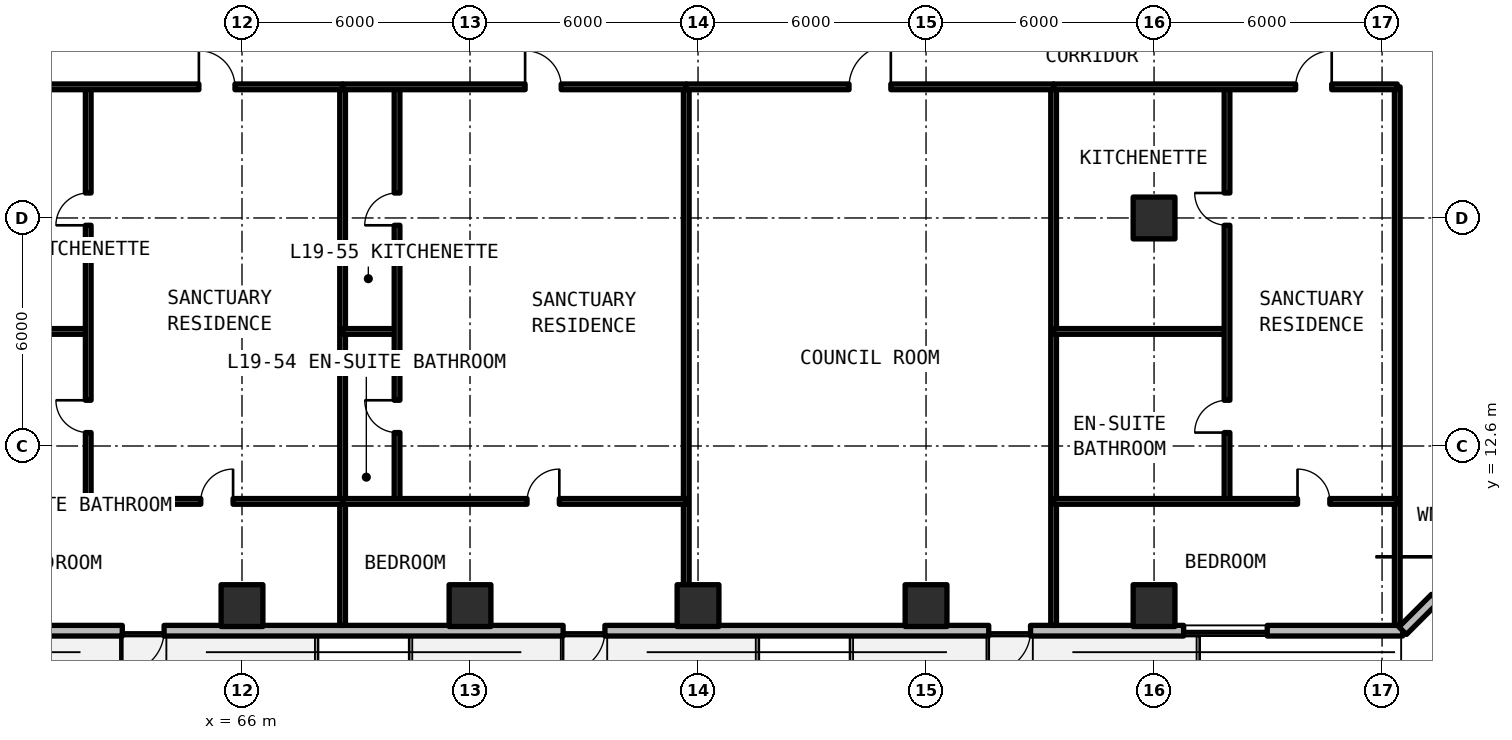
"""IFC4 building model, lengths in metres.
Left out: names, types, materials, properties, quantities, classifications, styles, units other than length and angle.
Written with IfcOpenShell. Run it as: python <this file> out.ifc"""

import sys

from ifc_helpers import new_model, si_unit, direction, frame, frame_2d, origin, origin_2d, place, context, subcontext, project, spatial, rectangle, extrude, element, fill, save


model = new_model("IFC4")
c1 = context("Model", 3, precision=1e-05, world=origin(), true_north=direction((0.0, 1.0)))
c2 = subcontext(c1, "Body", "Model", "MODEL_VIEW")
j1 = project(units=[si_unit("LENGTHUNIT", "METRE"), si_unit("PLANEANGLEUNIT", "RADIAN")], contexts=[c1])
p1 = place(None, origin())
s1 = spatial("IfcSite", under=j1, at=p1, CompositionType="ELEMENT")
p2 = place(p1, origin())
s2 = spatial("IfcBuilding", under=s1, at=p2, CompositionType="ELEMENT")
p3 = place(p2, frame((0.0, 0.0, 69.63)))
s3 = spatial("IfcBuildingStorey", under=s2, at=p3, CompositionType="ELEMENT", Elevation=69.63)
for number, where, z_axis, x_axis in (
    (1, (90.0, 18.6, 0.0), (0.0, 0.0, 1.0), (1.0, 0.0, 0.0)),
    (2, (66.0, 8.4, 0.0), (0.0, 0.0, 1.0), (1.0, 0.0, 0.0)),
    (3, (72.0, 8.4, 0.0), (0.0, 0.0, 1.0), (1.0, 0.0, 0.0)),
    (4, (78.0, 8.4, 0.0), (0.0, 0.0, 1.0), (1.0, 0.0, 0.0)),
    (5, (84.0, 8.4, 0.0), (0.0, 0.0, 1.0), (1.0, 0.0, 0.0)),
    (6, (90.0, 8.4, 0.0), (0.0, 0.0, 1.0), (1.0, 0.0, 0.0)),
):
    element("IfcColumn", number, at=place(p3, frame(where, z_axis=z_axis, x_axis=x_axis)), inside=s3, PredefinedType="COLUMN", context=c2, shape_type="SweptSolid", body=[
        extrude(rectangle(XDim=1.1, YDim=1.1, at=origin_2d()), origin(), (0.0, 0.0, 1.0), 3.63),
    ])
p4 = place(p3, frame((52.14, 7.74, 0.0), z_axis=(0.0, 0.0, 1.0), x_axis=(1.0, 0.0, 0.0)))
e7 = element("IfcWall", 7, at=p4, inside=s3, PredefinedType="SOLIDWALL", context=c2, shape_type="SweptSolid", body=[
    extrude(rectangle(XDim=44.402, YDim=0.28, at=frame_2d((22.201, 0.0))), origin(), (0.0, 0.0, 1.0), 3.35),
])
p5 = place(p4, frame((10.71, 0.0, 0.0)))
e8 = element("IfcOpeningElement", 8, at=p5, cuts=e7, PredefinedType="OPENING", context=c2, shape_type="SweptSolid", body=[
    extrude(rectangle(XDim=1.1, YDim=2.15, at=frame_2d((0.55, 1.075))), frame((0.0, 0.15, 0.0), z_axis=(0.0, -1.0, 0.0), x_axis=(1.0, 0.0, 0.0)), (0.0, 0.0, 1.0), 0.3),
])
p6 = place(p4, frame((22.31, 0.0, 0.0)))
e9 = element("IfcOpeningElement", 9, at=p6, cuts=e7, PredefinedType="OPENING", context=c2, shape_type="SweptSolid", body=[
    extrude(rectangle(XDim=1.1, YDim=2.15, at=frame_2d((0.55, 1.075))), frame((0.0, 0.15, 0.0), z_axis=(0.0, -1.0, 0.0), x_axis=(1.0, 0.0, 0.0)), (0.0, 0.0, 1.0), 0.3),
])
p7 = place(p4, frame((33.51, 0.0, 0.0)))
e10 = element("IfcOpeningElement", 10, at=p7, cuts=e7, PredefinedType="OPENING", context=c2, shape_type="SweptSolid", body=[
    extrude(rectangle(XDim=1.1, YDim=2.15, at=frame_2d((0.55, 1.075))), frame((0.0, 0.15, 0.0), z_axis=(0.0, -1.0, 0.0), x_axis=(1.0, 0.0, 0.0)), (0.0, 0.0, 1.0), 0.3),
])
p8 = place(p4, frame((2.622, 0.0, 0.78)))
e11 = element("IfcOpeningElement", 11, at=p8, cuts=e7, PredefinedType="OPENING", context=c2, shape_type="SweptSolid", body=[
    extrude(rectangle(XDim=2.2, YDim=1.66, at=frame_2d((1.1, 0.83))), frame((0.0, 0.15, 0.0), z_axis=(0.0, -1.0, 0.0), x_axis=(1.0, 0.0, 0.0)), (0.0, 0.0, 1.0), 0.3),
])
p9 = place(p4, frame((38.638, 0.0, 0.78)))
e12 = element("IfcOpeningElement", 12, at=p9, cuts=e7, PredefinedType="OPENING", context=c2, shape_type="SweptSolid", body=[
    extrude(rectangle(XDim=2.2, YDim=1.66, at=frame_2d((1.1, 0.83))), frame((0.0, 0.15, 0.0), z_axis=(0.0, -1.0, 0.0), x_axis=(1.0, 0.0, 0.0)), (0.0, 0.0, 1.0), 0.3),
])
p10 = place(p3, frame((96.542, 7.74, 0.0), z_axis=(0.0, 0.0, 1.0), x_axis=(0.707106781187, 0.707106781187, 0.0)))
e13 = element("IfcWall", 13, at=p10, inside=s3, PredefinedType="SOLIDWALL", context=c2, shape_type="SweptSolid", body=[
    extrude(rectangle(XDim=5.824, YDim=0.28, at=frame_2d((2.912, 0.0))), origin(), (0.0, 0.0, 1.0), 3.35),
])
p11 = place(p10, frame((1.212, 0.0, 0.78)))
e14 = element("IfcOpeningElement", 14, at=p11, cuts=e13, PredefinedType="OPENING", context=c2, shape_type="SweptSolid", body=[
    extrude(rectangle(XDim=3.4, YDim=1.66, at=frame_2d((1.7, 0.83))), frame((0.0, 0.15, 0.0), z_axis=(0.0, -1.0, 0.0), x_axis=(1.0, 0.0, 0.0)), (0.0, 0.0, 1.0), 0.3),
])
for number, where, z_axis, x_axis in (
    (15, (96.4, 7.88, 0.0), (0.0, 0.0, 1.0), (0.0, 1.0, 0.0)),
    (16, (68.647, 7.88, 0.0), (0.0, 0.0, 1.0), (0.0, 1.0, 0.0)),
):
    element("IfcWall", number, at=place(p3, frame(where, z_axis=z_axis, x_axis=x_axis)), inside=s3, PredefinedType="SOLIDWALL", context=c2, shape_type="SweptSolid", body=[
        extrude(rectangle(XDim=14.17, YDim=0.15, at=frame_2d((7.085, 0.0))), origin(), (0.0, 0.0, 1.0), 2.57),
    ])
p12 = place(p3, frame((59.604, 15.615, 0.0), z_axis=(0.0, 0.0, 1.0), x_axis=(1.0, 0.0, 0.0)))
e17 = element("IfcWall", 17, at=p12, inside=s3, PredefinedType="PARTITIONING", context=c2, shape_type="SweptSolid", body=[
    extrude(rectangle(XDim=2.35, YDim=0.15, at=frame_2d((1.175, 0.0))), origin(), (0.0, 0.0, 1.0), 2.57),
])
p13 = place(p3, frame((61.954, 11.142, 0.0), z_axis=(0.0, 0.0, 1.0), x_axis=(0.0, 1.0, 0.0)))
e18 = element("IfcWall", 18, at=p13, inside=s3, PredefinedType="PARTITIONING", context=c2, shape_type="SweptSolid", body=[
    extrude(rectangle(XDim=10.908, YDim=0.15, at=frame_2d((5.454, 0.0))), origin(), (0.0, 0.0, 1.0), 2.57),
])
p14 = place(p13, frame((1.811, 0.0, 0.0)))
e19 = element("IfcOpeningElement", 19, at=p14, cuts=e18, PredefinedType="OPENING", context=c2, shape_type="SweptSolid", body=[
    extrude(rectangle(XDim=0.85, YDim=2.1, at=frame_2d((0.425, 1.05))), frame((0.0, 0.085, 0.0), z_axis=(0.0, -1.0, 0.0), x_axis=(1.0, 0.0, 0.0)), (0.0, 0.0, 1.0), 0.17),
])
p15 = place(p13, frame((7.265, 0.0, 0.0)))
e20 = element("IfcOpeningElement", 20, at=p15, cuts=e18, PredefinedType="OPENING", context=c2, shape_type="SweptSolid", body=[
    extrude(rectangle(XDim=0.85, YDim=2.1, at=frame_2d((0.425, 1.05))), frame((0.0, 0.085, 0.0), z_axis=(0.0, -1.0, 0.0), x_axis=(1.0, 0.0, 0.0)), (0.0, 0.0, 1.0), 0.17),
])
p16 = place(p3, frame((59.604, 11.142, 0.0), z_axis=(0.0, 0.0, 1.0), x_axis=(1.0, 0.0, 0.0)))
e21 = element("IfcWall", 21, at=p16, inside=s3, PredefinedType="PARTITIONING", context=c2, shape_type="SweptSolid", body=[
    extrude(rectangle(XDim=9.043, YDim=0.15, at=frame_2d((4.521, 0.0))), origin(), (0.0, 0.0, 1.0), 2.57),
])
p17 = place(p16, frame((5.312, 0.0, 0.0)))
e22 = element("IfcOpeningElement", 22, at=p17, cuts=e21, PredefinedType="OPENING", context=c2, shape_type="SweptSolid", body=[
    extrude(rectangle(XDim=0.85, YDim=2.1, at=frame_2d((0.425, 1.05))), frame((0.0, 0.085, 0.0), z_axis=(0.0, -1.0, 0.0), x_axis=(1.0, 0.0, 0.0)), (0.0, 0.0, 1.0), 0.17),
])
p18 = place(p3, frame((59.604, 22.05, 0.0), z_axis=(0.0, 0.0, 1.0), x_axis=(1.0, 0.0, 0.0)))
e23 = element("IfcWall", 23, at=p18, inside=s3, PredefinedType="SOLIDWALL", context=c2, shape_type="SweptSolid", body=[
    extrude(rectangle(XDim=9.043, YDim=0.15, at=frame_2d((4.521, 0.0))), origin(), (0.0, 0.0, 1.0), 2.57),
])
p19 = place(p18, frame((5.262, 0.0, 0.0)))
e24 = element("IfcOpeningElement", 24, at=p19, cuts=e23, PredefinedType="OPENING", context=c2, shape_type="SweptSolid", body=[
    extrude(rectangle(XDim=0.95, YDim=2.15, at=frame_2d((0.475, 1.075))), frame((0.0, 0.085, 0.0), z_axis=(0.0, -1.0, 0.0), x_axis=(1.0, 0.0, 0.0)), (0.0, 0.0, 1.0), 0.17),
])
p20 = place(p3, frame((77.69, 7.88, 0.0), z_axis=(0.0, 0.0, 1.0), x_axis=(0.0, 1.0, 0.0)))
e25 = element("IfcWall", 25, at=p20, inside=s3, PredefinedType="SOLIDWALL", context=c2, shape_type="SweptSolid", body=[
    extrude(rectangle(XDim=14.17, YDim=0.15, at=frame_2d((7.085, 0.0))), origin(), (0.0, 0.0, 1.0), 2.57),
])
p21 = place(p3, frame((68.647, 15.615, 0.0), z_axis=(0.0, 0.0, 1.0), x_axis=(1.0, 0.0, 0.0)))
e26 = element("IfcWall", 26, at=p21, inside=s3, PredefinedType="PARTITIONING", context=c2, shape_type="SweptSolid", body=[
    extrude(rectangle(XDim=1.433, YDim=0.15, at=frame_2d((0.717, 0.0))), origin(), (0.0, 0.0, 1.0), 2.57),
])
p22 = place(p3, frame((70.08, 11.142, 0.0), z_axis=(0.0, 0.0, 1.0), x_axis=(0.0, 1.0, 0.0)))
e27 = element("IfcWall", 27, at=p22, inside=s3, PredefinedType="PARTITIONING", context=c2, shape_type="SweptSolid", body=[
    extrude(rectangle(XDim=10.908, YDim=0.15, at=frame_2d((5.454, 0.0))), origin(), (0.0, 0.0, 1.0), 2.57),
])
p23 = place(p22, frame((1.811, 0.0, 0.0)))
e28 = element("IfcOpeningElement", 28, at=p23, cuts=e27, PredefinedType="OPENING", context=c2, shape_type="SweptSolid", body=[
    extrude(rectangle(XDim=0.85, YDim=2.1, at=frame_2d((0.425, 1.05))), frame((0.0, 0.085, 0.0), z_axis=(0.0, -1.0, 0.0), x_axis=(1.0, 0.0, 0.0)), (0.0, 0.0, 1.0), 0.17),
])
p24 = place(p22, frame((7.265, 0.0, 0.0)))
e29 = element("IfcOpeningElement", 29, at=p24, cuts=e27, PredefinedType="OPENING", context=c2, shape_type="SweptSolid", body=[
    extrude(rectangle(XDim=0.85, YDim=2.1, at=frame_2d((0.425, 1.05))), frame((0.0, 0.085, 0.0), z_axis=(0.0, -1.0, 0.0), x_axis=(1.0, 0.0, 0.0)), (0.0, 0.0, 1.0), 0.17),
])
p25 = place(p3, frame((68.647, 11.142, 0.0), z_axis=(0.0, 0.0, 1.0), x_axis=(1.0, 0.0, 0.0)))
e30 = element("IfcWall", 30, at=p25, inside=s3, PredefinedType="PARTITIONING", context=c2, shape_type="SweptSolid", body=[
    extrude(rectangle(XDim=9.043, YDim=0.15, at=frame_2d((4.521, 0.0))), origin(), (0.0, 0.0, 1.0), 2.57),
])
p26 = place(p25, frame((4.853, 0.0, 0.0)))
e31 = element("IfcOpeningElement", 31, at=p26, cuts=e30, PredefinedType="OPENING", context=c2, shape_type="SweptSolid", body=[
    extrude(rectangle(XDim=0.85, YDim=2.1, at=frame_2d((0.425, 1.05))), frame((0.0, 0.085, 0.0), z_axis=(0.0, -1.0, 0.0), x_axis=(1.0, 0.0, 0.0)), (0.0, 0.0, 1.0), 0.17),
])
p27 = place(p3, frame((68.647, 22.05, 0.0), z_axis=(0.0, 0.0, 1.0), x_axis=(1.0, 0.0, 0.0)))
e32 = element("IfcWall", 32, at=p27, inside=s3, PredefinedType="SOLIDWALL", context=c2, shape_type="SweptSolid", body=[
    extrude(rectangle(XDim=9.043, YDim=0.15, at=frame_2d((4.521, 0.0))), origin(), (0.0, 0.0, 1.0), 2.57),
])
p28 = place(p27, frame((4.803, 0.0, 0.0)))
e33 = element("IfcOpeningElement", 33, at=p28, cuts=e32, PredefinedType="OPENING", context=c2, shape_type="SweptSolid", body=[
    extrude(rectangle(XDim=0.95, YDim=2.15, at=frame_2d((0.475, 1.075))), frame((0.0, 0.085, 0.0), z_axis=(0.0, -1.0, 0.0), x_axis=(1.0, 0.0, 0.0)), (0.0, 0.0, 1.0), 0.17),
])
p29 = place(p3, frame((87.357, 7.88, 0.0), z_axis=(0.0, 0.0, 1.0), x_axis=(0.0, 1.0, 0.0)))
e34 = element("IfcWall", 34, at=p29, inside=s3, PredefinedType="SOLIDWALL", context=c2, shape_type="SweptSolid", body=[
    extrude(rectangle(XDim=14.17, YDim=0.15, at=frame_2d((7.085, 0.0))), origin(), (0.0, 0.0, 1.0), 2.57),
])
p30 = place(p3, frame((77.69, 22.05, 0.0), z_axis=(0.0, 0.0, 1.0), x_axis=(1.0, 0.0, 0.0)))
e35 = element("IfcWall", 35, at=p30, inside=s3, PredefinedType="SOLIDWALL", context=c2, shape_type="SweptSolid", body=[
    extrude(rectangle(XDim=9.667, YDim=0.15, at=frame_2d((4.833, 0.0))), origin(), (0.0, 0.0, 1.0), 2.57),
])
p31 = place(p30, frame((4.283, 0.0, 0.0)))
e36 = element("IfcOpeningElement", 36, at=p31, cuts=e35, PredefinedType="OPENING", context=c2, shape_type="SweptSolid", body=[
    extrude(rectangle(XDim=1.1, YDim=2.15, at=frame_2d((0.55, 1.075))), frame((0.0, 0.085, 0.0), z_axis=(0.0, -1.0, 0.0), x_axis=(1.0, 0.0, 0.0)), (0.0, 0.0, 1.0), 0.17),
])
p32 = place(p3, frame((87.357, 15.615, 0.0), z_axis=(0.0, 0.0, 1.0), x_axis=(1.0, 0.0, 0.0)))
e37 = element("IfcWall", 37, at=p32, inside=s3, PredefinedType="PARTITIONING", context=c2, shape_type="SweptSolid", body=[
    extrude(rectangle(XDim=4.563, YDim=0.15, at=frame_2d((2.281, 0.0))), origin(), (0.0, 0.0, 1.0), 2.57),
])
p33 = place(p3, frame((91.92, 11.142, 0.0), z_axis=(0.0, 0.0, 1.0), x_axis=(0.0, 1.0, 0.0)))
e38 = element("IfcWall", 38, at=p33, inside=s3, PredefinedType="PARTITIONING", context=c2, shape_type="SweptSolid", body=[
    extrude(rectangle(XDim=10.908, YDim=0.15, at=frame_2d((5.454, 0.0))), origin(), (0.0, 0.0, 1.0), 2.57),
])
p34 = place(p33, frame((1.811, 0.0, 0.0)))
e39 = element("IfcOpeningElement", 39, at=p34, cuts=e38, PredefinedType="OPENING", context=c2, shape_type="SweptSolid", body=[
    extrude(rectangle(XDim=0.85, YDim=2.1, at=frame_2d((0.425, 1.05))), frame((0.0, 0.085, 0.0), z_axis=(0.0, -1.0, 0.0), x_axis=(1.0, 0.0, 0.0)), (0.0, 0.0, 1.0), 0.17),
])
p35 = place(p33, frame((7.265, 0.0, 0.0)))
e40 = element("IfcOpeningElement", 40, at=p35, cuts=e38, PredefinedType="OPENING", context=c2, shape_type="SweptSolid", body=[
    extrude(rectangle(XDim=0.85, YDim=2.1, at=frame_2d((0.425, 1.05))), frame((0.0, 0.085, 0.0), z_axis=(0.0, -1.0, 0.0), x_axis=(1.0, 0.0, 0.0)), (0.0, 0.0, 1.0), 0.17),
])
p36 = place(p3, frame((87.357, 11.142, 0.0), z_axis=(0.0, 0.0, 1.0), x_axis=(1.0, 0.0, 0.0)))
e41 = element("IfcWall", 41, at=p36, inside=s3, PredefinedType="PARTITIONING", context=c2, shape_type="SweptSolid", body=[
    extrude(rectangle(XDim=9.043, YDim=0.15, at=frame_2d((4.521, 0.0))), origin(), (0.0, 0.0, 1.0), 2.57),
])
p37 = place(p36, frame((6.418, 0.0, 0.0)))
e42 = element("IfcOpeningElement", 42, at=p37, cuts=e41, PredefinedType="OPENING", context=c2, shape_type="SweptSolid", body=[
    extrude(rectangle(XDim=0.85, YDim=2.1, at=frame_2d((0.425, 1.05))), frame((0.0, 0.085, 0.0), z_axis=(0.0, -1.0, 0.0), x_axis=(1.0, 0.0, 0.0)), (0.0, 0.0, 1.0), 0.17),
])
p38 = place(p3, frame((87.357, 22.05, 0.0), z_axis=(0.0, 0.0, 1.0), x_axis=(1.0, 0.0, 0.0)))
e43 = element("IfcWall", 43, at=p38, inside=s3, PredefinedType="SOLIDWALL", context=c2, shape_type="SweptSolid", body=[
    extrude(rectangle(XDim=9.043, YDim=0.15, at=frame_2d((4.521, 0.0))), origin(), (0.0, 0.0, 1.0), 2.57),
])
p39 = place(p38, frame((6.368, 0.0, 0.0)))
e44 = element("IfcOpeningElement", 44, at=p39, cuts=e43, PredefinedType="OPENING", context=c2, shape_type="SweptSolid", body=[
    extrude(rectangle(XDim=0.95, YDim=2.15, at=frame_2d((0.475, 1.075))), frame((0.0, 0.085, 0.0), z_axis=(0.0, -1.0, 0.0), x_axis=(1.0, 0.0, 0.0)), (0.0, 0.0, 1.0), 0.17),
])
p40 = place(p5, frame((1.1, 0.0, 0.0), z_axis=(0.0, 0.0, 1.0), x_axis=(-1.0, 0.0, 0.0)))
e45 = element("IfcDoor", 45, at=p40, inside=s3, OperationType="SINGLE_SWING_LEFT", PredefinedType="DOOR", context=c2, shape_type="SweptSolid", body=[
    extrude(rectangle(XDim=1.1, YDim=2.15, at=frame_2d((0.55, 1.075))), frame((0.0, 0.025, 0.0), z_axis=(0.0, -1.0, 0.0), x_axis=(1.0, 0.0, 0.0)), (0.0, 0.0, 1.0), 0.05),
])
fill(e8, e45)
p41 = place(p6, frame((1.1, 0.0, 0.0), z_axis=(0.0, 0.0, 1.0), x_axis=(-1.0, 0.0, 0.0)))
e46 = element("IfcDoor", 46, at=p41, inside=s3, OperationType="SINGLE_SWING_RIGHT", PredefinedType="DOOR", context=c2, shape_type="SweptSolid", body=[
    extrude(rectangle(XDim=1.1, YDim=2.15, at=frame_2d((0.55, 1.075))), frame((0.0, 0.025, 0.0), z_axis=(0.0, -1.0, 0.0), x_axis=(1.0, 0.0, 0.0)), (0.0, 0.0, 1.0), 0.05),
])
fill(e9, e46)
p42 = place(p7, frame((1.1, 0.0, 0.0), z_axis=(0.0, 0.0, 1.0), x_axis=(-1.0, 0.0, 0.0)))
e47 = element("IfcDoor", 47, at=p42, inside=s3, OperationType="SINGLE_SWING_LEFT", PredefinedType="DOOR", context=c2, shape_type="SweptSolid", body=[
    extrude(rectangle(XDim=1.1, YDim=2.15, at=frame_2d((0.55, 1.075))), frame((0.0, 0.025, 0.0), z_axis=(0.0, -1.0, 0.0), x_axis=(1.0, 0.0, 0.0)), (0.0, 0.0, 1.0), 0.05),
])
fill(e10, e47)
p43 = place(p9, origin())
e48 = element("IfcWindow", 48, at=p43, inside=s3, PartitioningType="SINGLE_PANEL", PredefinedType="WINDOW", context=c2, shape_type="SweptSolid", body=[
    extrude(rectangle(XDim=2.2, YDim=1.66, at=frame_2d((1.1, 0.83))), frame((0.0, 0.03, 0.0), z_axis=(0.0, -1.0, 0.0), x_axis=(1.0, 0.0, 0.0)), (0.0, 0.0, 1.0), 0.06),
])
fill(e12, e48)
p44 = place(p14, origin())
e49 = element("IfcDoor", 49, at=p44, inside=s3, OperationType="SINGLE_SWING_RIGHT", PredefinedType="DOOR", context=c2, shape_type="SweptSolid", body=[
    extrude(rectangle(XDim=0.85, YDim=2.1, at=frame_2d((0.425, 1.05))), frame((0.0, 0.025, 0.0), z_axis=(0.0, -1.0, 0.0), x_axis=(1.0, 0.0, 0.0)), (0.0, 0.0, 1.0), 0.05),
])
fill(e19, e49)
p45 = place(p15, origin())
e50 = element("IfcDoor", 50, at=p45, inside=s3, OperationType="SINGLE_SWING_LEFT", PredefinedType="DOOR", context=c2, shape_type="SweptSolid", body=[
    extrude(rectangle(XDim=0.85, YDim=2.1, at=frame_2d((0.425, 1.05))), frame((0.0, 0.025, 0.0), z_axis=(0.0, -1.0, 0.0), x_axis=(1.0, 0.0, 0.0)), (0.0, 0.0, 1.0), 0.05),
])
fill(e20, e50)
p46 = place(p17, origin())
e51 = element("IfcDoor", 51, at=p46, inside=s3, OperationType="SINGLE_SWING_RIGHT", PredefinedType="DOOR", context=c2, shape_type="SweptSolid", body=[
    extrude(rectangle(XDim=0.85, YDim=2.1, at=frame_2d((0.425, 1.05))), frame((0.0, 0.025, 0.0), z_axis=(0.0, -1.0, 0.0), x_axis=(1.0, 0.0, 0.0)), (0.0, 0.0, 1.0), 0.05),
])
fill(e22, e51)
p47 = place(p19, origin())
e52 = element("IfcDoor", 52, at=p47, inside=s3, OperationType="SINGLE_SWING_LEFT", PredefinedType="DOOR", context=c2, shape_type="SweptSolid", body=[
    extrude(rectangle(XDim=0.95, YDim=2.15, at=frame_2d((0.475, 1.075))), frame((0.0, 0.025, 0.0), z_axis=(0.0, -1.0, 0.0), x_axis=(1.0, 0.0, 0.0)), (0.0, 0.0, 1.0), 0.05),
])
fill(e24, e52)
p48 = place(p23, origin())
e53 = element("IfcDoor", 53, at=p48, inside=s3, OperationType="SINGLE_SWING_RIGHT", PredefinedType="DOOR", context=c2, shape_type="SweptSolid", body=[
    extrude(rectangle(XDim=0.85, YDim=2.1, at=frame_2d((0.425, 1.05))), frame((0.0, 0.025, 0.0), z_axis=(0.0, -1.0, 0.0), x_axis=(1.0, 0.0, 0.0)), (0.0, 0.0, 1.0), 0.05),
])
fill(e28, e53)
p49 = place(p24, origin())
e54 = element("IfcDoor", 54, at=p49, inside=s3, OperationType="SINGLE_SWING_LEFT", PredefinedType="DOOR", context=c2, shape_type="SweptSolid", body=[
    extrude(rectangle(XDim=0.85, YDim=2.1, at=frame_2d((0.425, 1.05))), frame((0.0, 0.025, 0.0), z_axis=(0.0, -1.0, 0.0), x_axis=(1.0, 0.0, 0.0)), (0.0, 0.0, 1.0), 0.05),
])
fill(e29, e54)
p50 = place(p26, origin())
e55 = element("IfcDoor", 55, at=p50, inside=s3, OperationType="SINGLE_SWING_RIGHT", PredefinedType="DOOR", context=c2, shape_type="SweptSolid", body=[
    extrude(rectangle(XDim=0.85, YDim=2.1, at=frame_2d((0.425, 1.05))), frame((0.0, 0.025, 0.0), z_axis=(0.0, -1.0, 0.0), x_axis=(1.0, 0.0, 0.0)), (0.0, 0.0, 1.0), 0.05),
])
fill(e31, e55)
p51 = place(p28, origin())
e56 = element("IfcDoor", 56, at=p51, inside=s3, OperationType="SINGLE_SWING_LEFT", PredefinedType="DOOR", context=c2, shape_type="SweptSolid", body=[
    extrude(rectangle(XDim=0.95, YDim=2.15, at=frame_2d((0.475, 1.075))), frame((0.0, 0.025, 0.0), z_axis=(0.0, -1.0, 0.0), x_axis=(1.0, 0.0, 0.0)), (0.0, 0.0, 1.0), 0.05),
])
fill(e33, e56)
p52 = place(p31, origin())
e57 = element("IfcDoor", 57, at=p52, inside=s3, OperationType="SINGLE_SWING_RIGHT", PredefinedType="DOOR", context=c2, shape_type="SweptSolid", body=[
    extrude(rectangle(XDim=1.1, YDim=2.15, at=frame_2d((0.55, 1.075))), frame((0.0, 0.025, 0.0), z_axis=(0.0, -1.0, 0.0), x_axis=(1.0, 0.0, 0.0)), (0.0, 0.0, 1.0), 0.05),
])
fill(e36, e57)
p53 = place(p34, origin())
e58 = element("IfcDoor", 58, at=p53, inside=s3, OperationType="SINGLE_SWING_LEFT", PredefinedType="DOOR", context=c2, shape_type="SweptSolid", body=[
    extrude(rectangle(XDim=0.85, YDim=2.1, at=frame_2d((0.425, 1.05))), frame((0.0, 0.025, 0.0), z_axis=(0.0, -1.0, 0.0), x_axis=(1.0, 0.0, 0.0)), (0.0, 0.0, 1.0), 0.05),
])
fill(e39, e58)
p54 = place(p35, origin())
e59 = element("IfcDoor", 59, at=p54, inside=s3, OperationType="SINGLE_SWING_RIGHT", PredefinedType="DOOR", context=c2, shape_type="SweptSolid", body=[
    extrude(rectangle(XDim=0.85, YDim=2.1, at=frame_2d((0.425, 1.05))), frame((0.0, 0.025, 0.0), z_axis=(0.0, -1.0, 0.0), x_axis=(1.0, 0.0, 0.0)), (0.0, 0.0, 1.0), 0.05),
])
fill(e40, e59)
p55 = place(p37, origin())
e60 = element("IfcDoor", 60, at=p55, inside=s3, OperationType="SINGLE_SWING_LEFT", PredefinedType="DOOR", context=c2, shape_type="SweptSolid", body=[
    extrude(rectangle(XDim=0.85, YDim=2.1, at=frame_2d((0.425, 1.05))), frame((0.0, 0.025, 0.0), z_axis=(0.0, -1.0, 0.0), x_axis=(1.0, 0.0, 0.0)), (0.0, 0.0, 1.0), 0.05),
])
fill(e42, e60)
p56 = place(p39, origin())
e61 = element("IfcDoor", 61, at=p56, inside=s3, OperationType="SINGLE_SWING_RIGHT", PredefinedType="DOOR", context=c2, shape_type="SweptSolid", body=[
    extrude(rectangle(XDim=0.95, YDim=2.15, at=frame_2d((0.475, 1.075))), frame((0.0, 0.025, 0.0), z_axis=(0.0, -1.0, 0.0), x_axis=(1.0, 0.0, 0.0)), (0.0, 0.0, 1.0), 0.05),
])
fill(e44, e61)
save(model, sys.argv[1])
